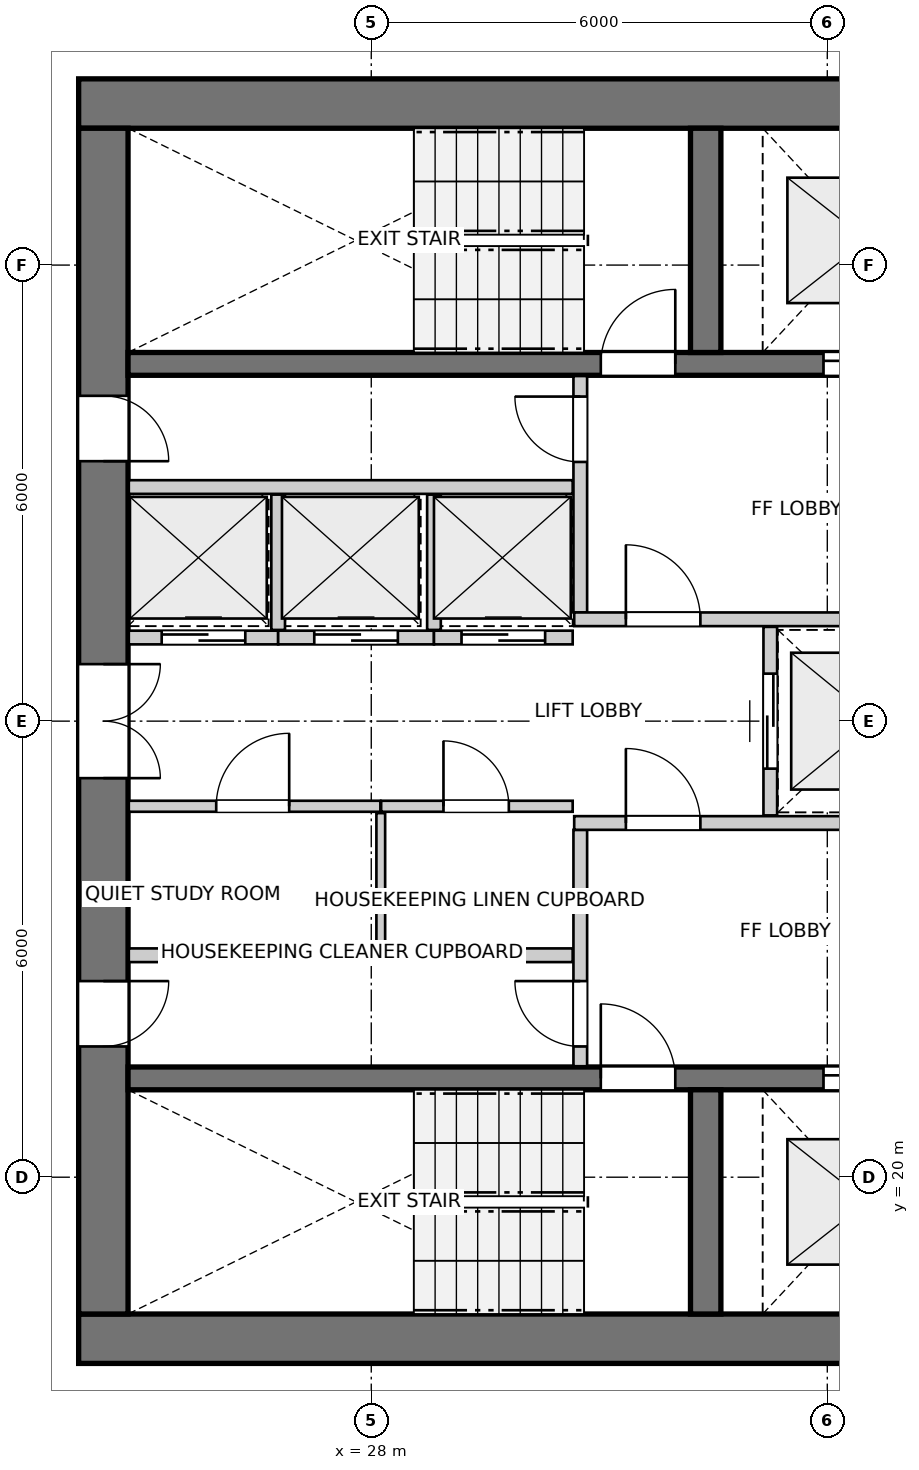
"""IFC4 building model, lengths in metres.
Left out: names, types, materials, properties, quantities, classifications, styles, units other than length and angle.
Written with IfcOpenShell. Run it as: python <this file> out.ifc"""

import sys

from ifc_helpers import new_model, si_unit, direction, frame, frame_2d, origin, place, context, subcontext, project, spatial, rectangle, extrude, source, transform, mapped, element, fill, save


model = new_model("IFC4")
c1 = context("Model", 3, precision=1e-05, world=origin(), true_north=direction((0.0, 1.0)))
c2 = subcontext(c1, "Body", "Model", "MODEL_VIEW")
j1 = project(units=[si_unit("LENGTHUNIT", "METRE"), si_unit("PLANEANGLEUNIT", "RADIAN")], contexts=[c1])
p1 = place(None, origin())
s1 = spatial("IfcSite", under=j1, at=p1, CompositionType="ELEMENT")
p2 = place(p1, origin())
s2 = spatial("IfcBuilding", under=s1, at=p2, CompositionType="ELEMENT")
p3 = place(p2, frame((0.0, 0.0, 165.0)))
s3 = spatial("IfcBuildingStorey", under=s2, at=p3, CompositionType="ELEMENT", Elevation=165.0)
for number, where, z_axis, x_axis in (
    (1, (24.15, 17.875, 0.0), (0.0, 0.0, 1.0), (1.0, 0.0, 0.0)),
    (2, (36.55, 34.125, 0.0), (0.0, 0.0, 1.0), (-1.0, 0.0, 0.0)),
):
    element("IfcWall", number, at=place(p3, frame(where, z_axis=z_axis, x_axis=x_axis)), inside=s3, PredefinedType="SHEAR", context=c2, shape_type="SweptSolid", body=[
        extrude(rectangle(XDim=12.4, YDim=0.65, at=frame_2d((6.2, 0.0))), origin(), (0.0, 0.0, 1.0), 2.95),
    ])
p4 = place(p3, frame((24.475, 33.8, 0.0), z_axis=(0.0, 0.0, 1.0), x_axis=(0.0, -1.0, 0.0)))
e3 = element("IfcWall", 3, at=p4, inside=s3, PredefinedType="SHEAR", context=c2, shape_type="SweptSolid", body=[
    extrude(rectangle(XDim=15.6, YDim=0.65, at=frame_2d((7.8, 0.0))), origin(), (0.0, 0.0, 1.0), 2.95),
])
p5 = place(p4, frame((7.05, 0.0, 0.0)))
e4 = element("IfcOpeningElement", 4, at=p5, cuts=e3, PredefinedType="OPENING", context=c2, shape_type="SweptSolid", body=[
    extrude(rectangle(XDim=1.5, YDim=2.15, at=frame_2d((0.75, 1.075))), frame((0.0, 0.335, 0.0), z_axis=(0.0, -1.0, 0.0), x_axis=(1.0, 0.0, 0.0)), (0.0, 0.0, 1.0), 0.67),
])
p6 = place(p4, frame((3.52, 0.0, 0.0)))
e5 = element("IfcOpeningElement", 5, at=p6, cuts=e3, PredefinedType="OPENING", context=c2, shape_type="SweptSolid", body=[
    extrude(rectangle(XDim=0.86, YDim=2.05, at=frame_2d((0.43, 1.025))), frame((0.0, 0.335, 0.0), z_axis=(0.0, -1.0, 0.0), x_axis=(1.0, 0.0, 0.0)), (0.0, 0.0, 1.0), 0.67),
])
p7 = place(p4, frame((11.22, 0.0, 0.0)))
e6 = element("IfcOpeningElement", 6, at=p7, cuts=e3, PredefinedType="OPENING", context=c2, shape_type="SweptSolid", body=[
    extrude(rectangle(XDim=0.86, YDim=2.05, at=frame_2d((0.43, 1.025))), frame((0.0, 0.335, 0.0), z_axis=(0.0, -1.0, 0.0), x_axis=(1.0, 0.0, 0.0)), (0.0, 0.0, 1.0), 0.67),
])
p8 = place(p3, frame((24.8, 21.3, 0.0), z_axis=(0.0, 0.0, 1.0), x_axis=(1.0, 0.0, 0.0)))
e7 = element("IfcWall", 7, at=p8, inside=s3, PredefinedType="SHEAR", context=c2, shape_type="SweptSolid", body=[
    extrude(rectangle(XDim=11.1, YDim=0.3, at=frame_2d((5.55, 0.0))), origin(), (0.0, 0.0, 1.0), 2.95),
])
p9 = place(p8, frame((6.22, 0.0, 0.0)))
e8 = element("IfcOpeningElement", 8, at=p9, cuts=e7, PredefinedType="OPENING", context=c2, shape_type="SweptSolid", body=[
    extrude(rectangle(XDim=0.98, YDim=2.15, at=frame_2d((0.49, 1.075))), frame((0.0, 0.16, 0.0), z_axis=(0.0, -1.0, 0.0), x_axis=(1.0, 0.0, 0.0)), (0.0, 0.0, 1.0), 0.32),
])
p10 = place(p8, frame((9.15, 0.0, 0.0)))
e9 = element("IfcOpeningElement", 9, at=p10, cuts=e7, PredefinedType="OPENING", context=c2, shape_type="SweptSolid", body=[
    extrude(rectangle(XDim=1.15, YDim=2.15, at=frame_2d((0.575, 1.075))), frame((0.0, 0.16, 0.0), z_axis=(0.0, -1.0, 0.0), x_axis=(1.0, 0.0, 0.0)), (0.0, 0.0, 1.0), 0.32),
])
p11 = place(p3, frame((32.4, 18.2, 0.0), z_axis=(0.0, 0.0, 1.0), x_axis=(0.0, 1.0, 0.0)))
e10 = element("IfcWall", 10, at=p11, inside=s3, PredefinedType="SHEAR", context=c2, shape_type="SweptSolid", body=[
    extrude(rectangle(XDim=2.95, YDim=0.4, at=frame_2d((1.475, 0.0))), origin(), (0.0, 0.0, 1.0), 2.95),
])
p12 = place(p3, frame((24.8, 30.7, 0.0), z_axis=(0.0, 0.0, 1.0), x_axis=(1.0, 0.0, 0.0)))
e11 = element("IfcWall", 11, at=p12, inside=s3, PredefinedType="SHEAR", context=c2, shape_type="SweptSolid", body=[
    extrude(rectangle(XDim=11.1, YDim=0.3, at=frame_2d((5.55, 0.0))), origin(), (0.0, 0.0, 1.0), 2.95),
])
p13 = place(p12, frame((6.22, 0.0, 0.0)))
e12 = element("IfcOpeningElement", 12, at=p13, cuts=e11, PredefinedType="OPENING", context=c2, shape_type="SweptSolid", body=[
    extrude(rectangle(XDim=0.98, YDim=2.15, at=frame_2d((0.49, 1.075))), frame((0.0, 0.16, 0.0), z_axis=(0.0, -1.0, 0.0), x_axis=(1.0, 0.0, 0.0)), (0.0, 0.0, 1.0), 0.32),
])
p14 = place(p12, frame((9.15, 0.0, 0.0)))
e13 = element("IfcOpeningElement", 13, at=p14, cuts=e11, PredefinedType="OPENING", context=c2, shape_type="SweptSolid", body=[
    extrude(rectangle(XDim=1.15, YDim=2.15, at=frame_2d((0.575, 1.075))), frame((0.0, 0.16, 0.0), z_axis=(0.0, -1.0, 0.0), x_axis=(1.0, 0.0, 0.0)), (0.0, 0.0, 1.0), 0.32),
])
p15 = place(p3, frame((32.4, 30.85, 0.0), z_axis=(0.0, 0.0, 1.0), x_axis=(0.0, 1.0, 0.0)))
e14 = element("IfcWall", 14, at=p15, inside=s3, PredefinedType="SHEAR", context=c2, shape_type="SweptSolid", body=[
    extrude(rectangle(XDim=2.95, YDim=0.4, at=frame_2d((1.475, 0.0))), origin(), (0.0, 0.0, 1.0), 2.95),
])
p16 = place(p3, frame((30.75, 21.46, 0.0), z_axis=(0.0, 0.0, 1.0), x_axis=(0.0, 1.0, 0.0)))
e15 = element("IfcWall", 15, at=p16, inside=s3, PredefinedType="PARTITIONING", context=c2, shape_type="SweptSolid", body=[
    extrude(rectangle(XDim=3.11, YDim=0.18, at=frame_2d((1.555, 0.0))), origin(), (0.0, 0.0, 1.0), 2.95),
])
p17 = place(p16, frame((0.26, 0.0, 0.0)))
e16 = element("IfcOpeningElement", 16, at=p17, cuts=e15, PredefinedType="OPENING", context=c2, shape_type="SweptSolid", body=[
    extrude(rectangle(XDim=0.86, YDim=2.05, at=frame_2d((0.43, 1.025))), frame((0.0, 0.1, 0.0), z_axis=(0.0, -1.0, 0.0), x_axis=(1.0, 0.0, 0.0)), (0.0, 0.0, 1.0), 0.2),
])
p18 = place(p3, frame((30.67, 24.66, 0.0), z_axis=(0.0, 0.0, 1.0), x_axis=(1.0, 0.0, 0.0)))
e17 = element("IfcWall", 17, at=p18, inside=s3, PredefinedType="PARTITIONING", context=c2, shape_type="SweptSolid", body=[
    extrude(rectangle(XDim=5.22, YDim=0.18, at=frame_2d((2.61, 0.0))), origin(), (0.0, 0.0, 1.0), 2.95),
])
p19 = place(p18, frame((0.68, 0.0, 0.0)))
e18 = element("IfcOpeningElement", 18, at=p19, cuts=e17, PredefinedType="OPENING", context=c2, shape_type="SweptSolid", body=[
    extrude(rectangle(XDim=0.98, YDim=2.15, at=frame_2d((0.49, 1.075))), frame((0.0, 0.1, 0.0), z_axis=(0.0, -1.0, 0.0), x_axis=(1.0, 0.0, 0.0)), (0.0, 0.0, 1.0), 0.2),
])
p20 = place(p3, frame((30.75, 27.43, 0.0), z_axis=(0.0, 0.0, 1.0), x_axis=(0.0, 1.0, 0.0)))
e19 = element("IfcWall", 19, at=p20, inside=s3, PredefinedType="PARTITIONING", context=c2, shape_type="SweptSolid", body=[
    extrude(rectangle(XDim=3.11, YDim=0.18, at=frame_2d((1.555, 0.0))), origin(), (0.0, 0.0, 1.0), 2.95),
])
p21 = place(p20, frame((1.98, 0.0, 0.0)))
e20 = element("IfcOpeningElement", 20, at=p21, cuts=e19, PredefinedType="OPENING", context=c2, shape_type="SweptSolid", body=[
    extrude(rectangle(XDim=0.86, YDim=2.05, at=frame_2d((0.43, 1.025))), frame((0.0, 0.1, 0.0), z_axis=(0.0, -1.0, 0.0), x_axis=(1.0, 0.0, 0.0)), (0.0, 0.0, 1.0), 0.2),
])
p22 = place(p3, frame((30.67, 27.34, 0.0), z_axis=(0.0, 0.0, 1.0), x_axis=(1.0, 0.0, 0.0)))
e21 = element("IfcWall", 21, at=p22, inside=s3, PredefinedType="PARTITIONING", context=c2, shape_type="SweptSolid", body=[
    extrude(rectangle(XDim=5.22, YDim=0.18, at=frame_2d((2.61, 0.0))), origin(), (0.0, 0.0, 1.0), 2.95),
])
p23 = place(p22, frame((0.68, 0.0, 0.0)))
e22 = element("IfcOpeningElement", 22, at=p23, cuts=e21, PredefinedType="OPENING", context=c2, shape_type="SweptSolid", body=[
    extrude(rectangle(XDim=0.98, YDim=2.15, at=frame_2d((0.49, 1.075))), frame((0.0, 0.1, 0.0), z_axis=(0.0, -1.0, 0.0), x_axis=(1.0, 0.0, 0.0)), (0.0, 0.0, 1.0), 0.2),
])
p24 = place(p3, frame((33.25, 24.76, 0.0), z_axis=(0.0, 0.0, 1.0), x_axis=(0.0, 1.0, 0.0)))
e23 = element("IfcWall", 23, at=p24, inside=s3, PredefinedType="PARTITIONING", context=c2, shape_type="SweptSolid", body=[
    extrude(rectangle(XDim=2.48, YDim=0.18, at=frame_2d((1.24, 0.0))), origin(), (0.0, 0.0, 1.0), 2.95),
])
p25 = place(p24, frame((0.615, 0.0, 0.0)))
e24 = element("IfcOpeningElement", 24, at=p25, cuts=e23, PredefinedType="OPENING", context=c2, shape_type="SweptSolid", body=[
    extrude(rectangle(XDim=1.25, YDim=2.15, at=frame_2d((0.625, 1.075))), frame((0.0, 0.1, 0.0), z_axis=(0.0, -1.0, 0.0), x_axis=(1.0, 0.0, 0.0)), (0.0, 0.0, 1.0), 0.2),
])
p26 = place(p3, frame((24.81, 22.92, 0.0), z_axis=(0.0, 0.0, 1.0), x_axis=(1.0, 0.0, 0.0)))
e25 = element("IfcWall", 25, at=p26, inside=s3, PredefinedType="PARTITIONING", context=c2, shape_type="SweptSolid", body=[
    extrude(rectangle(XDim=5.84, YDim=0.18, at=frame_2d((2.92, 0.0))), origin(), (0.0, 0.0, 1.0), 2.95),
])
p27 = place(p3, frame((24.81, 24.88, 0.0), z_axis=(0.0, 0.0, 1.0), x_axis=(1.0, 0.0, 0.0)))
e26 = element("IfcWall", 26, at=p27, inside=s3, PredefinedType="PARTITIONING", context=c2, shape_type="SweptSolid", body=[
    extrude(rectangle(XDim=3.31, YDim=0.145, at=frame_2d((1.655, 0.0))), origin(), (0.0, 0.0, 1.0), 2.95),
])
p28 = place(p27, frame((1.15, 0.0, 0.0)))
e27 = element("IfcOpeningElement", 27, at=p28, cuts=e26, PredefinedType="OPENING", context=c2, shape_type="SweptSolid", body=[
    extrude(rectangle(XDim=0.96, YDim=2.1, at=frame_2d((0.48, 1.05))), frame((0.0, 0.083, 0.0), z_axis=(0.0, -1.0, 0.0), x_axis=(1.0, 0.0, 0.0)), (0.0, 0.0, 1.0), 0.165),
])
p29 = place(p3, frame((28.13, 24.88, 0.0), z_axis=(0.0, 0.0, 1.0), x_axis=(1.0, 0.0, 0.0)))
e28 = element("IfcWall", 28, at=p29, inside=s3, PredefinedType="PARTITIONING", context=c2, shape_type="SweptSolid", body=[
    extrude(rectangle(XDim=2.52, YDim=0.145, at=frame_2d((1.26, 0.0))), origin(), (0.0, 0.0, 1.0), 2.95),
])
p30 = place(p29, frame((0.82, 0.0, 0.0)))
e29 = element("IfcOpeningElement", 29, at=p30, cuts=e28, PredefinedType="OPENING", context=c2, shape_type="SweptSolid", body=[
    extrude(rectangle(XDim=0.86, YDim=2.05, at=frame_2d((0.43, 1.025))), frame((0.0, 0.083, 0.0), z_axis=(0.0, -1.0, 0.0), x_axis=(1.0, 0.0, 0.0)), (0.0, 0.0, 1.0), 0.165),
])
p31 = place(p3, frame((28.125, 23.02, 0.0), z_axis=(0.0, 0.0, 1.0), x_axis=(0.0, 1.0, 0.0)))
e30 = element("IfcWall", 30, at=p31, inside=s3, PredefinedType="PARTITIONING", context=c2, shape_type="SweptSolid", body=[
    extrude(rectangle(XDim=1.77, YDim=0.115, at=frame_2d((0.885, 0.0))), origin(), (0.0, 0.0, 1.0), 2.95),
])
p32 = place(p3, frame((24.81, 29.08, 0.0), z_axis=(0.0, 0.0, 1.0), x_axis=(1.0, 0.0, 0.0)))
e31 = element("IfcWall", 31, at=p32, inside=s3, PredefinedType="PARTITIONING", context=c2, shape_type="SweptSolid", body=[
    extrude(rectangle(XDim=5.84, YDim=0.18, at=frame_2d((2.92, 0.0))), origin(), (0.0, 0.0, 1.0), 2.95),
])
p33 = place(p3, frame((24.81, 27.1, 0.0), z_axis=(0.0, 0.0, 1.0), x_axis=(1.0, 0.0, 0.0)))
e32 = element("IfcWall", 32, at=p33, inside=s3, PredefinedType="PARTITIONING", context=c2, shape_type="SweptSolid", body=[
    extrude(rectangle(XDim=1.965, YDim=0.18, at=frame_2d((0.982, 0.0))), origin(), (0.0, 0.0, 1.0), 2.95),
])
p34 = place(p33, frame((0.433, 0.0, 0.0)))
e33 = element("IfcOpeningElement", 33, at=p34, cuts=e32, PredefinedType="OPENING", context=c2, shape_type="SweptSolid", body=[
    extrude(rectangle(XDim=1.1, YDim=2.15, at=frame_2d((0.55, 1.075))), frame((0.0, 0.1, 0.0), z_axis=(0.0, -1.0, 0.0), x_axis=(1.0, 0.0, 0.0)), (0.0, 0.0, 1.0), 0.2),
])
p35 = place(p3, frame((26.775, 27.1, 0.0), z_axis=(0.0, 0.0, 1.0), x_axis=(1.0, 0.0, 0.0)))
e34 = element("IfcWall", 34, at=p35, inside=s3, PredefinedType="PARTITIONING", context=c2, shape_type="SweptSolid", body=[
    extrude(rectangle(XDim=2.05, YDim=0.18, at=frame_2d((1.025, 0.0))), origin(), (0.0, 0.0, 1.0), 2.95),
])
p36 = place(p35, frame((0.475, 0.0, 0.0)))
e35 = element("IfcOpeningElement", 35, at=p36, cuts=e34, PredefinedType="OPENING", context=c2, shape_type="SweptSolid", body=[
    extrude(rectangle(XDim=1.1, YDim=2.15, at=frame_2d((0.55, 1.075))), frame((0.0, 0.1, 0.0), z_axis=(0.0, -1.0, 0.0), x_axis=(1.0, 0.0, 0.0)), (0.0, 0.0, 1.0), 0.2),
])
p37 = place(p3, frame((26.775, 27.2, 0.0), z_axis=(0.0, 0.0, 1.0), x_axis=(0.0, 1.0, 0.0)))
e36 = element("IfcWall", 36, at=p37, inside=s3, PredefinedType="PARTITIONING", context=c2, shape_type="SweptSolid", body=[
    extrude(rectangle(XDim=1.78, YDim=0.18, at=frame_2d((0.89, 0.0))), origin(), (0.0, 0.0, 1.0), 2.95),
])
p38 = place(p3, frame((28.825, 27.1, 0.0), z_axis=(0.0, 0.0, 1.0), x_axis=(1.0, 0.0, 0.0)))
e37 = element("IfcWall", 37, at=p38, inside=s3, PredefinedType="PARTITIONING", context=c2, shape_type="SweptSolid", body=[
    extrude(rectangle(XDim=1.825, YDim=0.18, at=frame_2d((0.913, 0.0))), origin(), (0.0, 0.0, 1.0), 2.95),
])
p39 = place(p38, frame((0.363, 0.0, 0.0)))
e38 = element("IfcOpeningElement", 38, at=p39, cuts=e37, PredefinedType="OPENING", context=c2, shape_type="SweptSolid", body=[
    extrude(rectangle(XDim=1.1, YDim=2.15, at=frame_2d((0.55, 1.075))), frame((0.0, 0.1, 0.0), z_axis=(0.0, -1.0, 0.0), x_axis=(1.0, 0.0, 0.0)), (0.0, 0.0, 1.0), 0.2),
])
p40 = place(p3, frame((28.825, 27.2, 0.0), z_axis=(0.0, 0.0, 1.0), x_axis=(0.0, 1.0, 0.0)))
e39 = element("IfcWall", 39, at=p40, inside=s3, PredefinedType="PARTITIONING", context=c2, shape_type="SweptSolid", body=[
    extrude(rectangle(XDim=1.78, YDim=0.18, at=frame_2d((0.89, 0.0))), origin(), (0.0, 0.0, 1.0), 2.95),
])
m1 = source(origin(), c2, "Body", "SweptSolid", [
    extrude(rectangle(XDim=0.98, YDim=2.15, at=frame_2d((0.49, 1.075))), frame((0.0, 0.025, 0.0), z_axis=(0.0, -1.0, 0.0), x_axis=(1.0, 0.0, 0.0)), (0.0, 0.0, 1.0), 0.05),
])
p41 = place(p9, origin())
e40 = element("IfcDoor", 40, at=p41, inside=s3, OperationType="SINGLE_SWING_LEFT", PredefinedType="DOOR", context=c2, shape_type="MappedRepresentation", body=[
    mapped(m1, transform((0.0, 0.0, 0.0), x_axis=(1.0, 0.0, 0.0), y_axis=(0.0, 1.0, 0.0), z_axis=(0.0, 0.0, 1.0), scale=1.0)),
])
fill(e8, e40)
m2 = source(origin(), c2, "Body", "SweptSolid", [
    extrude(rectangle(XDim=1.15, YDim=2.15, at=frame_2d((0.575, 1.075))), frame((0.0, 0.025, 0.0), z_axis=(0.0, -1.0, 0.0), x_axis=(1.0, 0.0, 0.0)), (0.0, 0.0, 1.0), 0.05),
])
p42 = place(p10, origin())
e41 = element("IfcDoor", 41, at=p42, inside=s3, OperationType="DOUBLE_DOOR_SLIDING", PredefinedType="DOOR", context=c2, shape_type="MappedRepresentation", body=[
    mapped(m2, transform((0.0, 0.0, 0.0), x_axis=(1.0, 0.0, 0.0), y_axis=(0.0, 1.0, 0.0), z_axis=(0.0, 0.0, 1.0), scale=1.0)),
])
fill(e9, e41)
p43 = place(p13, origin())
e42 = element("IfcDoor", 42, at=p43, inside=s3, OperationType="SINGLE_SWING_RIGHT", PredefinedType="DOOR", context=c2, shape_type="MappedRepresentation", body=[
    mapped(m1, transform((0.0, 0.0, 0.0), x_axis=(1.0, 0.0, 0.0), y_axis=(0.0, 1.0, 0.0), z_axis=(0.0, 0.0, 1.0), scale=1.0)),
])
fill(e12, e42)
p44 = place(p14, origin())
e43 = element("IfcDoor", 43, at=p44, inside=s3, OperationType="DOUBLE_DOOR_SLIDING", PredefinedType="DOOR", context=c2, shape_type="MappedRepresentation", body=[
    mapped(m2, transform((0.0, 0.0, 0.0), x_axis=(1.0, 0.0, 0.0), y_axis=(0.0, 1.0, 0.0), z_axis=(0.0, 0.0, 1.0), scale=1.0)),
])
fill(e13, e43)
m3 = source(origin(), c2, "Body", "SweptSolid", [
    extrude(rectangle(XDim=1.5, YDim=2.15, at=frame_2d((0.75, 1.075))), frame((0.0, 0.025, 0.0), z_axis=(0.0, -1.0, 0.0), x_axis=(1.0, 0.0, 0.0)), (0.0, 0.0, 1.0), 0.05),
])
p45 = place(p5, origin())
e44 = element("IfcDoor", 44, at=p45, inside=s3, OperationType="DOUBLE_DOOR_SINGLE_SWING", PredefinedType="DOOR", context=c2, shape_type="MappedRepresentation", body=[
    mapped(m3, transform((0.0, 0.0, 0.0), x_axis=(1.0, 0.0, 0.0), y_axis=(0.0, 1.0, 0.0), z_axis=(0.0, 0.0, 1.0), scale=1.0)),
])
fill(e4, e44)
m4 = source(origin(), c2, "Body", "SweptSolid", [
    extrude(rectangle(XDim=0.86, YDim=2.05, at=frame_2d((0.43, 1.025))), frame((0.0, 0.025, 0.0), z_axis=(0.0, -1.0, 0.0), x_axis=(1.0, 0.0, 0.0)), (0.0, 0.0, 1.0), 0.05),
])
p46 = place(p6, origin())
e45 = element("IfcDoor", 45, at=p46, inside=s3, OperationType="SINGLE_SWING_RIGHT", PredefinedType="DOOR", context=c2, shape_type="MappedRepresentation", body=[
    mapped(m4, transform((0.0, 0.0, 0.0), x_axis=(1.0, 0.0, 0.0), y_axis=(0.0, 1.0, 0.0), z_axis=(0.0, 0.0, 1.0), scale=1.0)),
])
fill(e5, e45)
p47 = place(p7, origin())
e46 = element("IfcDoor", 46, at=p47, inside=s3, OperationType="SINGLE_SWING_LEFT", PredefinedType="DOOR", context=c2, shape_type="MappedRepresentation", body=[
    mapped(m4, transform((0.0, 0.0, 0.0), x_axis=(1.0, 0.0, 0.0), y_axis=(0.0, 1.0, 0.0), z_axis=(0.0, 0.0, 1.0), scale=1.0)),
])
fill(e6, e46)
p48 = place(p17, origin())
e47 = element("IfcDoor", 47, at=p48, inside=s3, OperationType="SINGLE_SWING_RIGHT", PredefinedType="DOOR", context=c2, shape_type="MappedRepresentation", body=[
    mapped(m4, transform((0.0, 0.0, 0.0), x_axis=(1.0, 0.0, 0.0), y_axis=(0.0, 1.0, 0.0), z_axis=(0.0, 0.0, 1.0), scale=1.0)),
])
fill(e16, e47)
p49 = place(p19, origin())
e48 = element("IfcDoor", 48, at=p49, inside=s3, OperationType="SINGLE_SWING_LEFT", PredefinedType="DOOR", context=c2, shape_type="MappedRepresentation", body=[
    mapped(m1, transform((0.0, 0.0, 0.0), x_axis=(1.0, 0.0, 0.0), y_axis=(0.0, 1.0, 0.0), z_axis=(0.0, 0.0, 1.0), scale=1.0)),
])
fill(e18, e48)
p50 = place(p21, origin())
e49 = element("IfcDoor", 49, at=p50, inside=s3, OperationType="SINGLE_SWING_RIGHT", PredefinedType="DOOR", context=c2, shape_type="MappedRepresentation", body=[
    mapped(m4, transform((0.0, 0.0, 0.0), x_axis=(1.0, 0.0, 0.0), y_axis=(0.0, 1.0, 0.0), z_axis=(0.0, 0.0, 1.0), scale=1.0)),
])
fill(e20, e49)
p51 = place(p23, origin())
e50 = element("IfcDoor", 50, at=p51, inside=s3, OperationType="SINGLE_SWING_LEFT", PredefinedType="DOOR", context=c2, shape_type="MappedRepresentation", body=[
    mapped(m1, transform((0.0, 0.0, 0.0), x_axis=(1.0, 0.0, 0.0), y_axis=(0.0, 1.0, 0.0), z_axis=(0.0, 0.0, 1.0), scale=1.0)),
])
fill(e22, e50)
m5 = source(origin(), c2, "Body", "SweptSolid", [
    extrude(rectangle(XDim=1.25, YDim=2.15, at=frame_2d((0.625, 1.075))), frame((0.0, 0.025, 0.0), z_axis=(0.0, -1.0, 0.0), x_axis=(1.0, 0.0, 0.0)), (0.0, 0.0, 1.0), 0.05),
])
p52 = place(p25, origin())
e51 = element("IfcDoor", 51, at=p52, inside=s3, OperationType="DOUBLE_DOOR_SLIDING", PredefinedType="DOOR", context=c2, shape_type="MappedRepresentation", body=[
    mapped(m5, transform((0.0, 0.0, 0.0), x_axis=(1.0, 0.0, 0.0), y_axis=(0.0, 1.0, 0.0), z_axis=(0.0, 0.0, 1.0), scale=1.0)),
])
fill(e24, e51)
m6 = source(origin(), c2, "Body", "SweptSolid", [
    extrude(rectangle(XDim=0.96, YDim=2.1, at=frame_2d((0.48, 1.05))), frame((0.0, 0.025, 0.0), z_axis=(0.0, -1.0, 0.0), x_axis=(1.0, 0.0, 0.0)), (0.0, 0.0, 1.0), 0.05),
])
p53 = place(p28, origin())
e52 = element("IfcDoor", 52, at=p53, inside=s3, OperationType="SINGLE_SWING_RIGHT", PredefinedType="DOOR", context=c2, shape_type="MappedRepresentation", body=[
    mapped(m6, transform((0.0, 0.0, 0.0), x_axis=(1.0, 0.0, 0.0), y_axis=(0.0, 1.0, 0.0), z_axis=(0.0, 0.0, 1.0), scale=1.0)),
])
fill(e27, e52)
p54 = place(p30, origin())
e53 = element("IfcDoor", 53, at=p54, inside=s3, OperationType="SINGLE_SWING_LEFT", PredefinedType="DOOR", context=c2, shape_type="MappedRepresentation", body=[
    mapped(m4, transform((0.0, 0.0, 0.0), x_axis=(1.0, 0.0, 0.0), y_axis=(0.0, 1.0, 0.0), z_axis=(0.0, 0.0, 1.0), scale=1.0)),
])
fill(e29, e53)
m7 = source(origin(), c2, "Body", "SweptSolid", [
    extrude(rectangle(XDim=1.1, YDim=2.15, at=frame_2d((0.55, 1.075))), frame((0.0, 0.025, 0.0), z_axis=(0.0, -1.0, 0.0), x_axis=(1.0, 0.0, 0.0)), (0.0, 0.0, 1.0), 0.05),
])
p55 = place(p34, origin())
e54 = element("IfcDoor", 54, at=p55, inside=s3, OperationType="DOUBLE_DOOR_SLIDING", PredefinedType="DOOR", context=c2, shape_type="MappedRepresentation", body=[
    mapped(m7, transform((0.0, 0.0, 0.0), x_axis=(1.0, 0.0, 0.0), y_axis=(0.0, 1.0, 0.0), z_axis=(0.0, 0.0, 1.0), scale=1.0)),
])
fill(e33, e54)
p56 = place(p36, origin())
e55 = element("IfcDoor", 55, at=p56, inside=s3, OperationType="DOUBLE_DOOR_SLIDING", PredefinedType="DOOR", context=c2, shape_type="MappedRepresentation", body=[
    mapped(m7, transform((0.0, 0.0, 0.0), x_axis=(1.0, 0.0, 0.0), y_axis=(0.0, 1.0, 0.0), z_axis=(0.0, 0.0, 1.0), scale=1.0)),
])
fill(e35, e55)
p57 = place(p39, origin())
e56 = element("IfcDoor", 56, at=p57, inside=s3, OperationType="DOUBLE_DOOR_SLIDING", PredefinedType="DOOR", context=c2, shape_type="MappedRepresentation", body=[
    mapped(m7, transform((0.0, 0.0, 0.0), x_axis=(1.0, 0.0, 0.0), y_axis=(0.0, 1.0, 0.0), z_axis=(0.0, 0.0, 1.0), scale=1.0)),
])
fill(e38, e56)
save(model, sys.argv[1])
